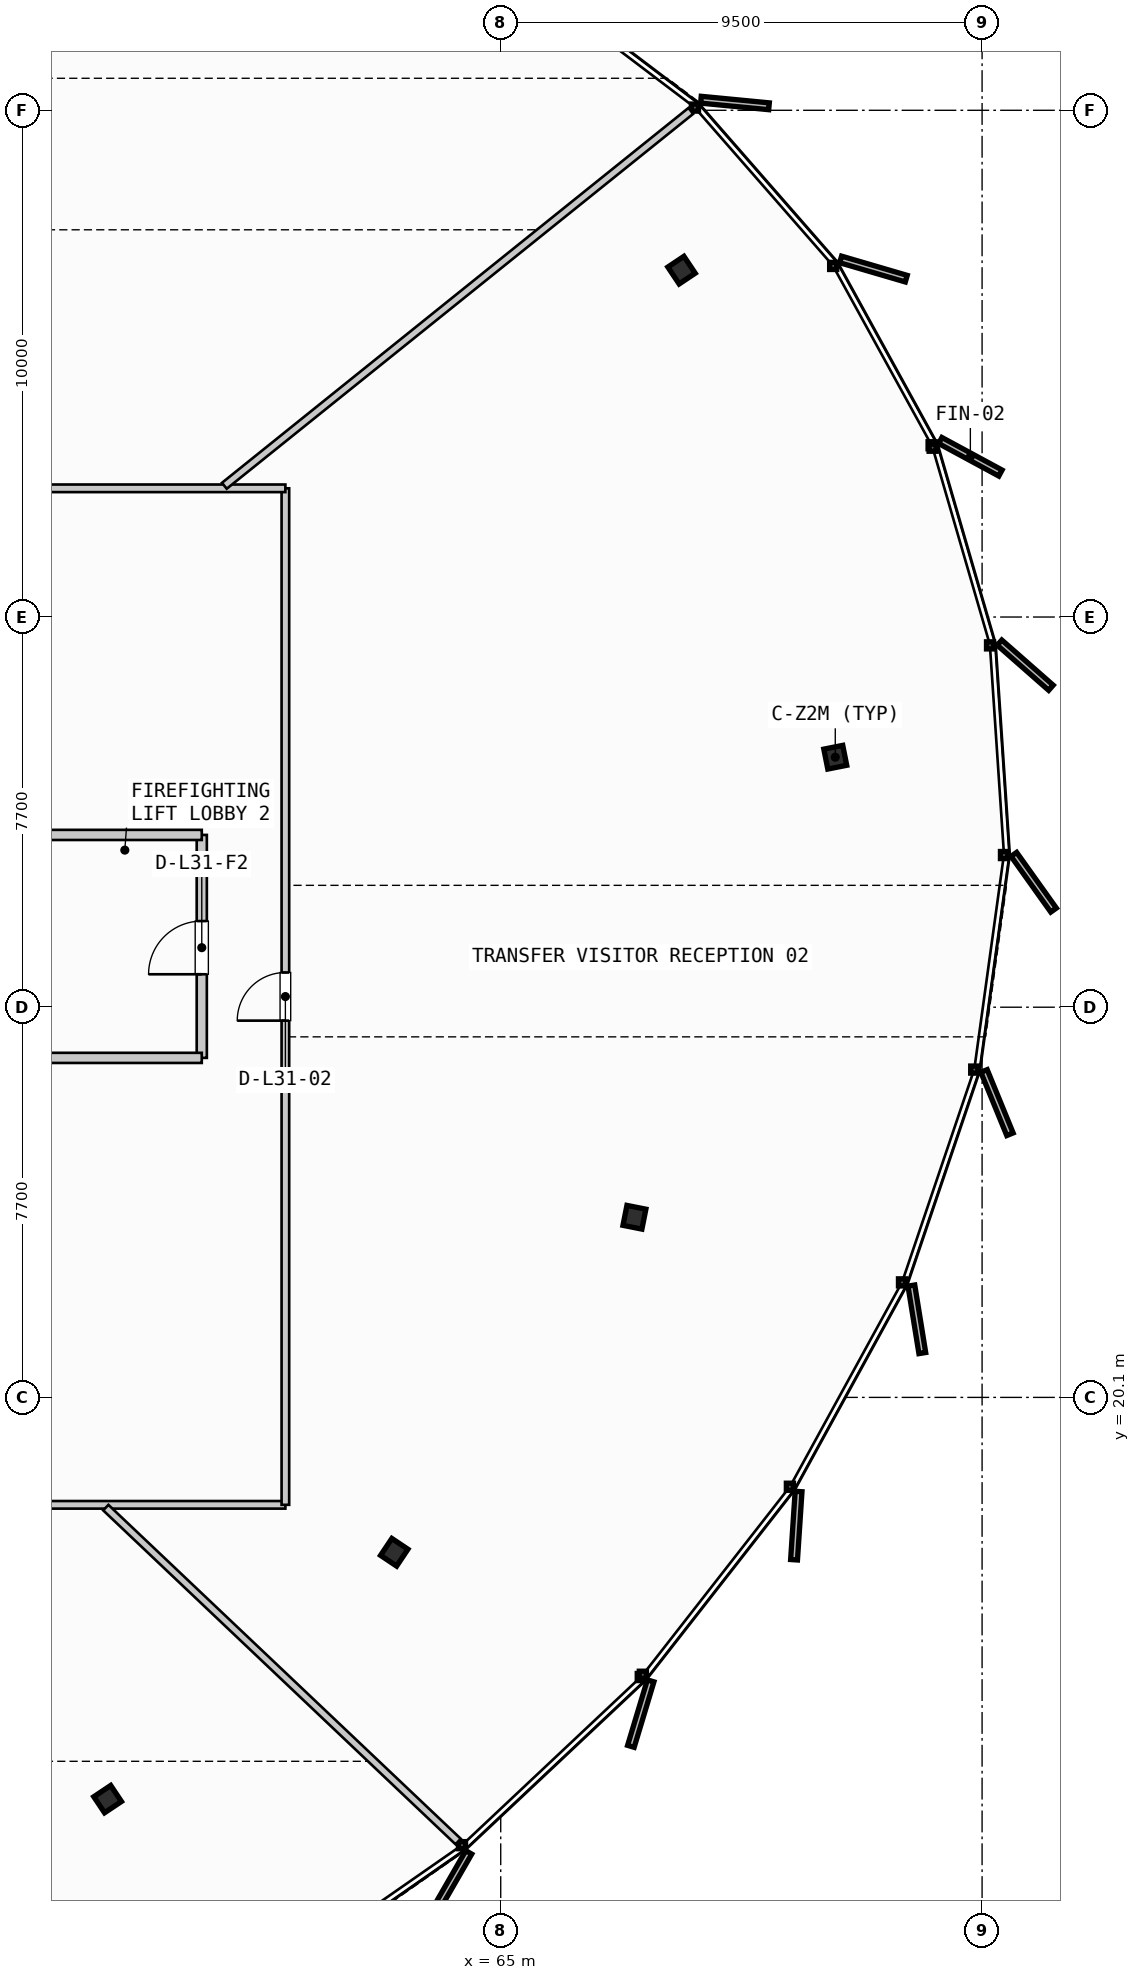
"""IFC4 building model, lengths in metres.
Left out: names, types, materials, properties, quantities, classifications, styles, units other than length and angle.
Written with IfcOpenShell. Run it as: python <this file> out.ifc"""

import sys

from ifc_helpers import new_model, si_unit, direction, frame, frame_2d, origin, origin_2d, place, context, subcontext, project, spatial, rectangle, i_section, extrude, source, transform, mapped, element, fill, save


model = new_model("IFC4")
c1 = context("Model", 3, precision=1e-05, world=origin(), true_north=direction((0.0, 1.0)))
c2 = subcontext(c1, "Body", "Model", "MODEL_VIEW")
j1 = project(units=[si_unit("LENGTHUNIT", "METRE"), si_unit("PLANEANGLEUNIT", "RADIAN")], contexts=[c1])
p1 = place(None, origin())
s1 = spatial("IfcSite", under=j1, at=p1, CompositionType="ELEMENT")
p2 = place(p1, origin())
s2 = spatial("IfcBuilding", under=s1, at=p2, CompositionType="ELEMENT")
p3 = place(p2, frame((0.0, 0.0, 125.2)))
s3 = spatial("IfcBuildingStorey", under=s2, at=p3, CompositionType="ELEMENT", Elevation=125.2)
m1 = source(origin(), c2, "Body", "SweptSolid", [
    extrude(i_section(OverallWidth=0.401, OverallDepth=0.381, WebThickness=0.032, FlangeThickness=0.051, FilletRadius=0.015, at=origin_2d()), origin(), (0.0, 0.0, 1.0), 3.35),
])
for number, where, z_axis, x_axis in (
    (1, (71.603, 32.733, 0.0), (0.0, 0.0, 1.0), (0.981, 0.195, 0.0)),
    (2, (68.569, 42.345, 0.0), (0.0, 0.0, 1.0), (0.831, 0.556, 0.0)),
    (3, (57.242, 12.172, 0.0), (0.0, 0.0, 1.0), (0.556, -0.831, 0.0)),
    (4, (62.899, 17.043, 0.0), (0.0, 0.0, 1.0), (0.831, -0.556, 0.0)),
    (5, (67.639, 23.655, 0.0), (0.0, 0.0, 1.0), (0.981, -0.195, 0.0)),
):
    element("IfcColumn", number, at=place(p3, frame(where, z_axis=z_axis, x_axis=x_axis)), inside=s3, PredefinedType="COLUMN", context=c2, shape_type="MappedRepresentation", body=[
        mapped(m1, transform((0.0, 0.0, 0.0), scale=1.0)),
    ])
p4 = place(p3, frame((59.1, 26.8, 0.0), z_axis=(0.0, 0.0, 1.0), x_axis=(0.0, 1.0, 0.0)))
e6 = element("IfcWall", 6, at=p4, inside=s3, PredefinedType="PARTITIONING", context=c2, shape_type="SweptSolid", body=[
    extrude(rectangle(XDim=4.4, YDim=0.2, at=frame_2d((2.2, 0.0))), origin(), (0.0, 0.0, 1.0), 2.635),
])
p5 = place(p4, frame((1.65, 0.0, 0.0)))
e7 = element("IfcOpeningElement", 7, at=p5, cuts=e6, PredefinedType="OPENING", context=c2, shape_type="SweptSolid", body=[
    extrude(rectangle(XDim=1.05, YDim=2.15, at=frame_2d((0.525, 1.075))), frame((0.0, 0.11, 0.0), z_axis=(0.0, -1.0, 0.0), x_axis=(1.0, 0.0, 0.0)), (0.0, 0.0, 1.0), 0.22),
])
for number, where, z_axis, x_axis in (
    (8, (55.885, 26.8, 0.0), (0.0, 0.0, 1.0), (1.0, 0.0, 0.0)),
    (9, (55.885, 31.2, 0.0), (0.0, 0.0, 1.0), (1.0, 0.0, 0.0)),
):
    element("IfcWall", number, at=place(p3, frame(where, z_axis=z_axis, x_axis=x_axis)), inside=s3, PredefinedType="PARTITIONING", context=c2, shape_type="SweptSolid", body=[
        extrude(rectangle(XDim=3.215, YDim=0.2, at=frame_2d((1.607, 0.0))), origin(), (0.0, 0.0, 1.0), 2.635),
    ])
p6 = place(p3, frame((31.29, 17.98, 0.0), z_axis=(0.0, 0.0, 1.0), x_axis=(1.0, 0.0, 0.0)))
e10 = element("IfcWall", 10, at=p6, inside=s3, PredefinedType="PARTITIONING", context=c2, shape_type="SweptSolid", body=[
    extrude(rectangle(XDim=29.46, YDim=0.15, at=frame_2d((14.73, 0.0))), origin(), (0.0, 0.0, 1.0), 2.635),
])
p7 = place(p6, frame((12.807, 0.0, 0.0)))
e11 = element("IfcOpeningElement", 11, at=p7, cuts=e10, PredefinedType="OPENING", context=c2, shape_type="SweptSolid", body=[
    extrude(rectangle(XDim=0.95, YDim=2.15, at=frame_2d((0.475, 1.075))), frame((0.0, 0.085, 0.0), z_axis=(0.0, -1.0, 0.0), x_axis=(1.0, 0.0, 0.0)), (0.0, 0.0, 1.0), 0.17),
])
p8 = place(p3, frame((60.75, 17.98, 0.0), z_axis=(0.0, 0.0, 1.0), x_axis=(0.0, 1.0, 0.0)))
e12 = element("IfcWall", 12, at=p8, inside=s3, PredefinedType="PARTITIONING", context=c2, shape_type="SweptSolid", body=[
    extrude(rectangle(XDim=20.06, YDim=0.15, at=frame_2d((10.03, 0.0))), origin(), (0.0, 0.0, 1.0), 2.635),
])
p9 = place(p8, frame((9.555, 0.0, 0.0)))
e13 = element("IfcOpeningElement", 13, at=p9, cuts=e12, PredefinedType="OPENING", context=c2, shape_type="SweptSolid", body=[
    extrude(rectangle(XDim=0.95, YDim=2.15, at=frame_2d((0.475, 1.075))), frame((0.0, 0.085, 0.0), z_axis=(0.0, -1.0, 0.0), x_axis=(1.0, 0.0, 0.0)), (0.0, 0.0, 1.0), 0.17),
])
p10 = place(p3, frame((60.75, 38.04, 0.0), z_axis=(0.0, 0.0, 1.0), x_axis=(-1.0, 0.0, 0.0)))
e14 = element("IfcWall", 14, at=p10, inside=s3, PredefinedType="PARTITIONING", context=c2, shape_type="SweptSolid", body=[
    extrude(rectangle(XDim=29.46, YDim=0.15, at=frame_2d((14.73, 0.0))), origin(), (0.0, 0.0, 1.0), 2.635),
])
p11 = place(p10, frame((12.498, 0.0, 0.0)))
e15 = element("IfcOpeningElement", 15, at=p11, cuts=e14, PredefinedType="OPENING", context=c2, shape_type="SweptSolid", body=[
    extrude(rectangle(XDim=0.95, YDim=2.15, at=frame_2d((0.475, 1.075))), frame((0.0, 0.085, 0.0), z_axis=(0.0, -1.0, 0.0), x_axis=(1.0, 0.0, 0.0)), (0.0, 0.0, 1.0), 0.17),
])
p12 = place(p3, frame((57.206, 17.925, 0.0), z_axis=(0.0, 0.0, 1.0), x_axis=(0.725826765277, -0.687877537653, 0.0)))
e16 = element("IfcWall", 16, at=p12, inside=s3, PredefinedType="PARTITIONING", context=c2, shape_type="SweptSolid", body=[
    extrude(rectangle(XDim=9.579, YDim=0.15, at=frame_2d((4.79, 0.0))), origin(), (0.0, 0.0, 1.0), 2.635),
])
p13 = place(p3, frame((59.546, 38.09, 0.0), z_axis=(0.0, 0.0, 1.0), x_axis=(0.779503527127, 0.626397837797, 0.0)))
e17 = element("IfcWall", 17, at=p13, inside=s3, PredefinedType="PARTITIONING", context=c2, shape_type="SweptSolid", body=[
    extrude(rectangle(XDim=11.81, YDim=0.15, at=frame_2d((5.905, 0.0))), origin(), (0.0, 0.0, 1.0), 2.635),
])
m2 = source(origin(), c2, "Body", "SweptSolid", [
    extrude(rectangle(XDim=1.05, YDim=2.15, at=frame_2d((0.525, 1.075))), frame((0.0, 0.025, 0.0), z_axis=(0.0, -1.0, 0.0), x_axis=(1.0, 0.0, 0.0)), (0.0, 0.0, 1.0), 0.05),
])
p14 = place(p5, origin())
e18 = element("IfcDoor", 18, at=p14, inside=s3, OperationType="SINGLE_SWING_LEFT", PredefinedType="DOOR", context=c2, shape_type="MappedRepresentation", body=[
    mapped(m2, transform((0.0, 0.0, 0.0), scale=1.0)),
])
fill(e7, e18)
m3 = source(origin(), c2, "Body", "SweptSolid", [
    extrude(rectangle(XDim=0.95, YDim=2.15, at=frame_2d((0.475, 1.075))), frame((0.0, 0.025, 0.0), z_axis=(0.0, -1.0, 0.0), x_axis=(1.0, 0.0, 0.0)), (0.0, 0.0, 1.0), 0.05),
])
p15 = place(p9, origin())
e19 = element("IfcDoor", 19, at=p15, inside=s3, OperationType="SINGLE_SWING_LEFT", PredefinedType="DOOR", context=c2, shape_type="MappedRepresentation", body=[
    mapped(m3, transform((0.0, 0.0, 0.0), scale=1.0)),
])
fill(e13, e19)
save(model, sys.argv[1])
